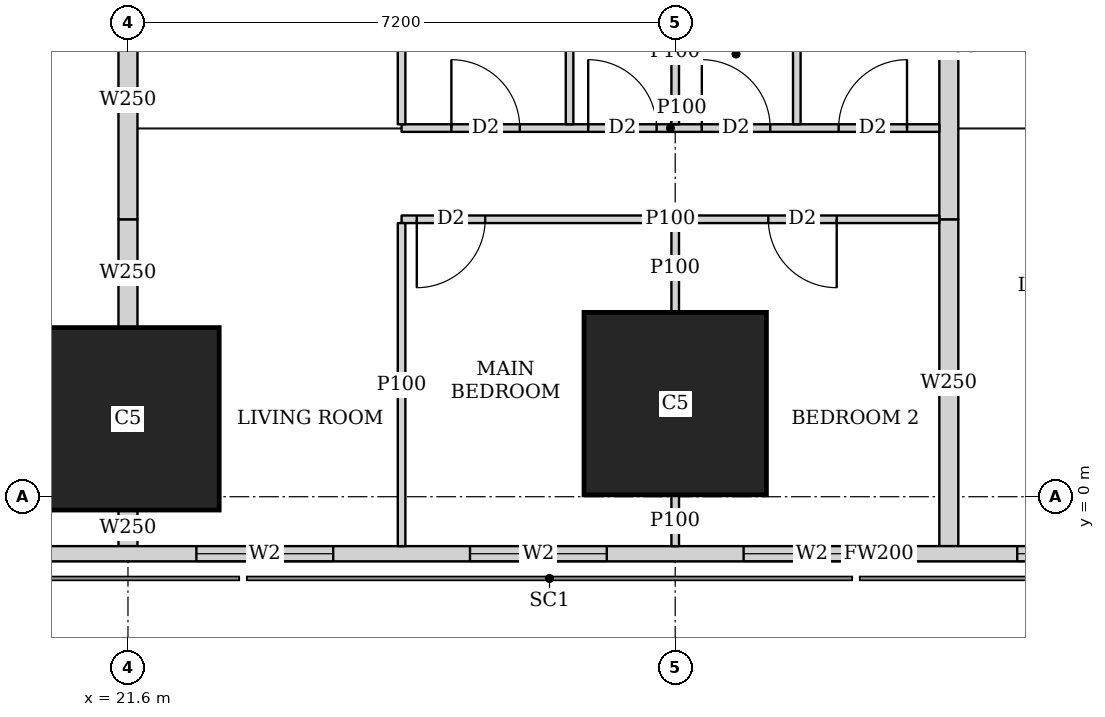
"""IFC4 building model, lengths in metres.
Left out: names, types, materials, properties, quantities, classifications, styles, units other than length and angle.
Written with IfcOpenShell. Run it as: python <this file> out.ifc"""

import sys

from ifc_helpers import new_model, si_unit, direction, frame, frame_2d, origin, origin_2d, place, context, subcontext, project, spatial, rectangle, extrude, element, fill, save


model = new_model("IFC4")
c1 = context("Model", 3, precision=1e-05, world=origin(), true_north=direction((0.0, 1.0)))
c2 = subcontext(c1, "Body", "Model", "MODEL_VIEW")
j1 = project(units=[si_unit("LENGTHUNIT", "METRE"), si_unit("PLANEANGLEUNIT", "RADIAN")], contexts=[c1])
p1 = place(None, origin())
s1 = spatial("IfcSite", under=j1, at=p1, CompositionType="ELEMENT")
p2 = place(p1, origin())
s2 = spatial("IfcBuilding", under=s1, at=p2, CompositionType="ELEMENT")
p3 = place(p2, frame((0.0, 0.0, 242.45)))
s3 = spatial("IfcBuildingStorey", under=s2, at=p3, CompositionType="ELEMENT", Elevation=242.45)
for number, where, z_axis, x_axis in (
    (1, (21.6, 1.025, 0.0), (0.0, 0.0, 1.0), (1.0, 0.0, 0.0)),
    (2, (28.8, 1.225, 0.0), (0.0, 0.0, 1.0), (1.0, 0.0, 0.0)),
):
    element("IfcColumn", number, at=place(p3, frame(where, z_axis=z_axis, x_axis=x_axis)), inside=s3, PredefinedType="COLUMN", context=c2, shape_type="SweptSolid", body=[
        extrude(rectangle(XDim=2.4, YDim=2.4, at=origin_2d()), origin(), (0.0, 0.0, 1.0), 3.75),
    ])
p4 = place(p3, frame((14.563, -0.75, 0.0), z_axis=(0.0, 0.0, 1.0), x_axis=(1.0, 0.0, 0.0)))
e3 = element("IfcWall", 3, at=p4, inside=s3, PredefinedType="SOLIDWALL", context=c2, shape_type="SweptSolid", body=[
    extrude(rectangle(XDim=33.228, YDim=0.2, at=frame_2d((16.614, 0.0))), origin(), (0.0, 0.0, 1.0), 3.45),
])
p5 = place(p4, frame((2.319, 0.0, 0.9)))
e4 = element("IfcOpeningElement", 4, at=p5, cuts=e3, PredefinedType="OPENING", context=c2, shape_type="SweptSolid", body=[
    extrude(rectangle(XDim=2.4, YDim=1.5, at=frame_2d((1.2, 0.75))), frame((0.0, 0.11, 0.0), z_axis=(0.0, -1.0, 0.0), x_axis=(1.0, 0.0, 0.0)), (0.0, 0.0, 1.0), 0.22),
])
p6 = place(p4, frame((7.937, 0.0, 0.9)))
e5 = element("IfcOpeningElement", 5, at=p6, cuts=e3, PredefinedType="OPENING", context=c2, shape_type="SweptSolid", body=[
    extrude(rectangle(XDim=1.8, YDim=1.5, at=frame_2d((0.9, 0.75))), frame((0.0, 0.11, 0.0), z_axis=(0.0, -1.0, 0.0), x_axis=(1.0, 0.0, 0.0)), (0.0, 0.0, 1.0), 0.22),
])
p7 = place(p4, frame((11.537, 0.0, 0.9)))
e6 = element("IfcOpeningElement", 6, at=p7, cuts=e3, PredefinedType="OPENING", context=c2, shape_type="SweptSolid", body=[
    extrude(rectangle(XDim=1.8, YDim=1.5, at=frame_2d((0.9, 0.75))), frame((0.0, 0.11, 0.0), z_axis=(0.0, -1.0, 0.0), x_axis=(1.0, 0.0, 0.0)), (0.0, 0.0, 1.0), 0.22),
])
p8 = place(p4, frame((15.137, 0.0, 0.9)))
e7 = element("IfcOpeningElement", 7, at=p8, cuts=e3, PredefinedType="OPENING", context=c2, shape_type="SweptSolid", body=[
    extrude(rectangle(XDim=1.8, YDim=1.5, at=frame_2d((0.9, 0.75))), frame((0.0, 0.11, 0.0), z_axis=(0.0, -1.0, 0.0), x_axis=(1.0, 0.0, 0.0)), (0.0, 0.0, 1.0), 0.22),
])
p9 = place(p4, frame((18.737, 0.0, 0.9)))
e8 = element("IfcOpeningElement", 8, at=p9, cuts=e3, PredefinedType="OPENING", context=c2, shape_type="SweptSolid", body=[
    extrude(rectangle(XDim=1.8, YDim=1.5, at=frame_2d((0.9, 0.75))), frame((0.0, 0.11, 0.0), z_axis=(0.0, -1.0, 0.0), x_axis=(1.0, 0.0, 0.0)), (0.0, 0.0, 1.0), 0.22),
])
p10 = place(p4, frame((22.337, 0.0, 0.9)))
e9 = element("IfcOpeningElement", 9, at=p10, cuts=e3, PredefinedType="OPENING", context=c2, shape_type="SweptSolid", body=[
    extrude(rectangle(XDim=1.8, YDim=1.5, at=frame_2d((0.9, 0.75))), frame((0.0, 0.11, 0.0), z_axis=(0.0, -1.0, 0.0), x_axis=(1.0, 0.0, 0.0)), (0.0, 0.0, 1.0), 0.22),
])
p11 = place(p4, frame((25.937, 0.0, 0.9)))
e10 = element("IfcOpeningElement", 10, at=p11, cuts=e3, PredefinedType="OPENING", context=c2, shape_type="SweptSolid", body=[
    extrude(rectangle(XDim=1.8, YDim=1.5, at=frame_2d((0.9, 0.75))), frame((0.0, 0.11, 0.0), z_axis=(0.0, -1.0, 0.0), x_axis=(1.0, 0.0, 0.0)), (0.0, 0.0, 1.0), 0.22),
])
p12 = place(p3, frame((32.275, 3.65, 0.0), z_axis=(0.0, 0.0, 1.0), x_axis=(-1.0, 0.0, 0.0)))
e11 = element("IfcWall", 11, at=p12, inside=s3, PredefinedType="PARTITIONING", context=c2, shape_type="SweptSolid", body=[
    extrude(rectangle(XDim=7.075, YDim=0.1, at=frame_2d((3.538, 0.0))), origin(), (0.0, 0.0, 1.0), 3.45),
])
p13 = place(p12, frame((5.975, 0.0, 0.0)))
e12 = element("IfcOpeningElement", 12, at=p13, cuts=e11, PredefinedType="OPENING", context=c2, shape_type="SweptSolid", body=[
    extrude(rectangle(XDim=0.9, YDim=2.1, at=frame_2d((0.45, 1.05))), frame((0.0, 0.06, 0.0), z_axis=(0.0, -1.0, 0.0), x_axis=(1.0, 0.0, 0.0)), (0.0, 0.0, 1.0), 0.12),
])
p14 = place(p12, frame((1.35, 0.0, 0.0)))
e13 = element("IfcOpeningElement", 13, at=p14, cuts=e11, PredefinedType="OPENING", context=c2, shape_type="SweptSolid", body=[
    extrude(rectangle(XDim=0.9, YDim=2.1, at=frame_2d((0.45, 1.05))), frame((0.0, 0.06, 0.0), z_axis=(0.0, -1.0, 0.0), x_axis=(1.0, 0.0, 0.0)), (0.0, 0.0, 1.0), 0.12),
])
p15 = place(p3, frame((32.275, 4.85, 0.0), z_axis=(0.0, 0.0, 1.0), x_axis=(-1.0, 0.0, 0.0)))
e14 = element("IfcWall", 14, at=p15, inside=s3, PredefinedType="PARTITIONING", context=c2, shape_type="SweptSolid", body=[
    extrude(rectangle(XDim=7.075, YDim=0.1, at=frame_2d((3.538, 0.0))), origin(), (0.0, 0.0, 1.0), 3.45),
])
p16 = place(p15, frame((5.52, 0.0, 0.0)))
e15 = element("IfcOpeningElement", 15, at=p16, cuts=e14, PredefinedType="OPENING", context=c2, shape_type="SweptSolid", body=[
    extrude(rectangle(XDim=0.9, YDim=2.1, at=frame_2d((0.45, 1.05))), frame((0.0, 0.06, 0.0), z_axis=(0.0, -1.0, 0.0), x_axis=(1.0, 0.0, 0.0)), (0.0, 0.0, 1.0), 0.12),
])
p17 = place(p15, frame((2.225, 0.0, 0.0)))
e16 = element("IfcOpeningElement", 16, at=p17, cuts=e14, PredefinedType="OPENING", context=c2, shape_type="SweptSolid", body=[
    extrude(rectangle(XDim=0.9, YDim=2.1, at=frame_2d((0.45, 1.05))), frame((0.0, 0.06, 0.0), z_axis=(0.0, -1.0, 0.0), x_axis=(1.0, 0.0, 0.0)), (0.0, 0.0, 1.0), 0.12),
])
p18 = place(p15, frame((3.72, 0.0, 0.0)))
e17 = element("IfcOpeningElement", 17, at=p18, cuts=e14, PredefinedType="OPENING", context=c2, shape_type="SweptSolid", body=[
    extrude(rectangle(XDim=0.9, YDim=2.1, at=frame_2d((0.45, 1.05))), frame((0.0, 0.06, 0.0), z_axis=(0.0, -1.0, 0.0), x_axis=(1.0, 0.0, 0.0)), (0.0, 0.0, 1.0), 0.12),
])
p19 = place(p15, frame((0.425, 0.0, 0.0)))
e18 = element("IfcOpeningElement", 18, at=p19, cuts=e14, PredefinedType="OPENING", context=c2, shape_type="SweptSolid", body=[
    extrude(rectangle(XDim=0.9, YDim=2.1, at=frame_2d((0.45, 1.05))), frame((0.0, 0.06, 0.0), z_axis=(0.0, -1.0, 0.0), x_axis=(1.0, 0.0, 0.0)), (0.0, 0.0, 1.0), 0.12),
])
p20 = place(p3, frame((25.2, -0.65, 0.0), z_axis=(0.0, 0.0, 1.0), x_axis=(0.0, 1.0, 0.0)))
e19 = element("IfcWall", 19, at=p20, inside=s3, PredefinedType="PARTITIONING", context=c2, shape_type="SweptSolid", body=[
    extrude(rectangle(XDim=4.25, YDim=0.1, at=frame_2d((2.125, 0.0))), origin(), (0.0, 0.0, 1.0), 2.0),
])
p21 = place(p3, frame((28.8, -0.65, 0.0), z_axis=(0.0, 0.0, 1.0), x_axis=(0.0, 1.0, 0.0)))
e20 = element("IfcWall", 20, at=p21, inside=s3, PredefinedType="PARTITIONING", context=c2, shape_type="SweptSolid", body=[
    extrude(rectangle(XDim=0.674, YDim=0.1, at=frame_2d((0.337, 0.0))), origin(), (0.0, 0.0, 1.0), 3.45),
])
p22 = place(p3, frame((28.8, 2.426, 0.0), z_axis=(0.0, 0.0, 1.0), x_axis=(0.0, 1.0, 0.0)))
e21 = element("IfcWall", 21, at=p22, inside=s3, PredefinedType="PARTITIONING", context=c2, shape_type="SweptSolid", body=[
    extrude(rectangle(XDim=1.174, YDim=0.1, at=frame_2d((0.587, 0.0))), origin(), (0.0, 0.0, 1.0), 3.45),
])
p23 = place(p3, frame((25.2, 4.9, 0.0), z_axis=(0.0, 0.0, 1.0), x_axis=(0.0, 1.0, 0.0)))
e22 = element("IfcWall", 22, at=p23, inside=s3, PredefinedType="PARTITIONING", context=c2, shape_type="SweptSolid", body=[
    extrude(rectangle(XDim=3.275, YDim=0.1, at=frame_2d((1.638, 0.0))), origin(), (0.0, 0.0, 1.0), 3.45),
])
p24 = place(p3, frame((28.8, 4.9, 0.0), z_axis=(0.0, 0.0, 1.0), x_axis=(0.0, 1.0, 0.0)))
e23 = element("IfcWall", 23, at=p24, inside=s3, PredefinedType="PARTITIONING", context=c2, shape_type="SweptSolid", body=[
    extrude(rectangle(XDim=1.899, YDim=0.1, at=frame_2d((0.95, 0.0))), origin(), (0.0, 0.0, 1.0), 3.45),
])
for number, where, z_axis, x_axis in (
    (24, (27.41, 4.9, 0.0), (0.0, 0.0, 1.0), (0.0, 1.0, 0.0)),
    (25, (30.4, 4.9, 0.0), (0.0, 0.0, 1.0), (0.0, 1.0, 0.0)),
):
    element("IfcWall", number, at=place(p3, frame(where, z_axis=z_axis, x_axis=x_axis)), inside=s3, PredefinedType="PARTITIONING", context=c2, shape_type="SweptSolid", body=[
        extrude(rectangle(XDim=3.275, YDim=0.1, at=frame_2d((1.638, 0.0))), origin(), (0.0, 0.0, 1.0), 3.45),
    ])
p25 = place(p3, frame((21.6, -0.65, 0.0), z_axis=(0.0, 0.0, 1.0), x_axis=(0.0, 1.0, 0.0)))
e26 = element("IfcWall", 26, at=p25, inside=s3, PredefinedType="SOLIDWALL", context=c2, shape_type="SweptSolid", body=[
    extrude(rectangle(XDim=0.474, YDim=0.25, at=frame_2d((0.237, 0.0))), origin(), (0.0, 0.0, 1.0), 2.0),
])
p26 = place(p3, frame((21.6, 2.226, 0.0), z_axis=(0.0, 0.0, 1.0), x_axis=(0.0, 1.0, 0.0)))
e27 = element("IfcWall", 27, at=p26, inside=s3, PredefinedType="SOLIDWALL", context=c2, shape_type="SweptSolid", body=[
    extrude(rectangle(XDim=1.424, YDim=0.25, at=frame_2d((0.712, 0.0))), origin(), (0.0, 0.0, 1.0), 2.0),
])
p27 = place(p3, frame((21.6, 3.65, 0.0), z_axis=(0.0, 0.0, 1.0), x_axis=(0.0, 1.0, 0.0)))
e28 = element("IfcWall", 28, at=p27, inside=s3, PredefinedType="SOLIDWALL", context=c2, shape_type="SweptSolid", body=[
    extrude(rectangle(XDim=3.149, YDim=0.25, at=frame_2d((1.575, 0.0))), origin(), (0.0, 0.0, 1.0), 3.45),
])
p28 = place(p3, frame((32.4, -0.65, 0.0), z_axis=(0.0, 0.0, 1.0), x_axis=(0.0, 1.0, 0.0)))
e29 = element("IfcWall", 29, at=p28, inside=s3, PredefinedType="SOLIDWALL", context=c2, shape_type="SweptSolid", body=[
    extrude(rectangle(XDim=4.3, YDim=0.25, at=frame_2d((2.15, 0.0))), origin(), (0.0, 0.0, 1.0), 2.0),
])
p29 = place(p3, frame((32.4, 3.65, 0.0), z_axis=(0.0, 0.0, 1.0), x_axis=(0.0, 1.0, 0.0)))
e30 = element("IfcWall", 30, at=p29, inside=s3, PredefinedType="SOLIDWALL", context=c2, shape_type="SweptSolid", body=[
    extrude(rectangle(XDim=4.525, YDim=0.25, at=frame_2d((2.263, 0.0))), origin(), (0.0, 0.0, 1.0), 3.45),
])
p30 = place(p6, origin())
e31 = element("IfcWindow", 31, at=p30, inside=s3, PartitioningType="SINGLE_PANEL", PredefinedType="WINDOW", context=c2, shape_type="SweptSolid", body=[
    extrude(rectangle(XDim=1.8, YDim=1.5, at=frame_2d((0.9, 0.75))), frame((0.0, 0.03, 0.0), z_axis=(0.0, -1.0, 0.0), x_axis=(1.0, 0.0, 0.0)), (0.0, 0.0, 1.0), 0.06),
])
fill(e5, e31)
p31 = place(p7, origin())
e32 = element("IfcWindow", 32, at=p31, inside=s3, PartitioningType="SINGLE_PANEL", PredefinedType="WINDOW", context=c2, shape_type="SweptSolid", body=[
    extrude(rectangle(XDim=1.8, YDim=1.5, at=frame_2d((0.9, 0.75))), frame((0.0, 0.03, 0.0), z_axis=(0.0, -1.0, 0.0), x_axis=(1.0, 0.0, 0.0)), (0.0, 0.0, 1.0), 0.06),
])
fill(e6, e32)
p32 = place(p8, origin())
e33 = element("IfcWindow", 33, at=p32, inside=s3, PartitioningType="SINGLE_PANEL", PredefinedType="WINDOW", context=c2, shape_type="SweptSolid", body=[
    extrude(rectangle(XDim=1.8, YDim=1.5, at=frame_2d((0.9, 0.75))), frame((0.0, 0.03, 0.0), z_axis=(0.0, -1.0, 0.0), x_axis=(1.0, 0.0, 0.0)), (0.0, 0.0, 1.0), 0.06),
])
fill(e7, e33)
p33 = place(p9, origin())
e34 = element("IfcWindow", 34, at=p33, inside=s3, PartitioningType="SINGLE_PANEL", PredefinedType="WINDOW", context=c2, shape_type="SweptSolid", body=[
    extrude(rectangle(XDim=1.8, YDim=1.5, at=frame_2d((0.9, 0.75))), frame((0.0, 0.03, 0.0), z_axis=(0.0, -1.0, 0.0), x_axis=(1.0, 0.0, 0.0)), (0.0, 0.0, 1.0), 0.06),
])
fill(e8, e34)
p34 = place(p13, origin())
e35 = element("IfcDoor", 35, at=p34, inside=s3, OperationType="SINGLE_SWING_RIGHT", PredefinedType="DOOR", context=c2, shape_type="SweptSolid", body=[
    extrude(rectangle(XDim=0.9, YDim=2.1, at=frame_2d((0.45, 1.05))), frame((0.0, 0.025, 0.0), z_axis=(0.0, -1.0, 0.0), x_axis=(1.0, 0.0, 0.0)), (0.0, 0.0, 1.0), 0.05),
])
fill(e12, e35)
p35 = place(p14, origin())
e36 = element("IfcDoor", 36, at=p35, inside=s3, OperationType="SINGLE_SWING_LEFT", PredefinedType="DOOR", context=c2, shape_type="SweptSolid", body=[
    extrude(rectangle(XDim=0.9, YDim=2.1, at=frame_2d((0.45, 1.05))), frame((0.0, 0.025, 0.0), z_axis=(0.0, -1.0, 0.0), x_axis=(1.0, 0.0, 0.0)), (0.0, 0.0, 1.0), 0.05),
])
fill(e13, e36)
p36 = place(p16, origin())
e37 = element("IfcDoor", 37, at=p36, inside=s3, OperationType="SINGLE_SWING_LEFT", PredefinedType="DOOR", context=c2, shape_type="SweptSolid", body=[
    extrude(rectangle(XDim=0.9, YDim=2.1, at=frame_2d((0.45, 1.05))), frame((0.0, 0.025, 0.0), z_axis=(0.0, -1.0, 0.0), x_axis=(1.0, 0.0, 0.0)), (0.0, 0.0, 1.0), 0.05),
])
fill(e15, e37)
p37 = place(p17, origin())
e38 = element("IfcDoor", 38, at=p37, inside=s3, OperationType="SINGLE_SWING_LEFT", PredefinedType="DOOR", context=c2, shape_type="SweptSolid", body=[
    extrude(rectangle(XDim=0.9, YDim=2.1, at=frame_2d((0.45, 1.05))), frame((0.0, 0.025, 0.0), z_axis=(0.0, -1.0, 0.0), x_axis=(1.0, 0.0, 0.0)), (0.0, 0.0, 1.0), 0.05),
])
fill(e16, e38)
p38 = place(p18, origin())
e39 = element("IfcDoor", 39, at=p38, inside=s3, OperationType="SINGLE_SWING_LEFT", PredefinedType="DOOR", context=c2, shape_type="SweptSolid", body=[
    extrude(rectangle(XDim=0.9, YDim=2.1, at=frame_2d((0.45, 1.05))), frame((0.0, 0.025, 0.0), z_axis=(0.0, -1.0, 0.0), x_axis=(1.0, 0.0, 0.0)), (0.0, 0.0, 1.0), 0.05),
])
fill(e17, e39)
p39 = place(p19, origin())
e40 = element("IfcDoor", 40, at=p39, inside=s3, OperationType="SINGLE_SWING_RIGHT", PredefinedType="DOOR", context=c2, shape_type="SweptSolid", body=[
    extrude(rectangle(XDim=0.9, YDim=2.1, at=frame_2d((0.45, 1.05))), frame((0.0, 0.025, 0.0), z_axis=(0.0, -1.0, 0.0), x_axis=(1.0, 0.0, 0.0)), (0.0, 0.0, 1.0), 0.05),
])
fill(e18, e40)
save(model, sys.argv[1])
